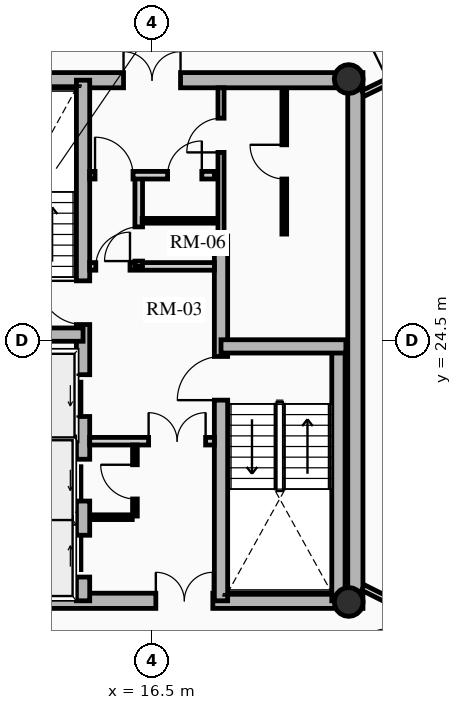
"""IFC4 building model, lengths in metres.
Left out: names, types, materials, properties, quantities, classifications, styles, units other than length and angle.
Written with IfcOpenShell. Run it as: python <this file> out.ifc"""

import sys

from ifc_helpers import new_model, si_unit, direction, frame, frame_2d, origin, origin_2d, place, context, subcontext, project, spatial, rectangle, hollow_circle, extrude, source, transform, mapped, element, fill, save


model = new_model("IFC4")
c1 = context("Model", 3, precision=1e-05, world=origin(), true_north=direction((0.0, 1.0)))
c2 = subcontext(c1, "Body", "Model", "MODEL_VIEW")
j1 = project(units=[si_unit("LENGTHUNIT", "METRE"), si_unit("PLANEANGLEUNIT", "RADIAN")], contexts=[c1])
p1 = place(None, origin())
s1 = spatial("IfcSite", under=j1, at=p1, CompositionType="ELEMENT")
p2 = place(p1, origin())
s2 = spatial("IfcBuilding", under=s1, at=p2, CompositionType="ELEMENT")
p3 = place(p2, frame((0.0, 0.0, 154.51)))
s3 = spatial("IfcBuildingStorey", under=s2, at=p3, CompositionType="ELEMENT", Elevation=154.51)
p4 = place(p3, frame((21.85, 17.45, 0.0), z_axis=(0.0, 0.0, 1.0), x_axis=(0.0, 1.0, 0.0)))
e1 = element("IfcWall", 1, at=p4, inside=s3, PredefinedType="SHEAR", context=c2, shape_type="SweptSolid", body=[
    extrude(rectangle(XDim=14.1, YDim=0.4, at=frame_2d((7.05, 0.0))), origin(), (0.0, 0.0, 1.0), 2.91),
])
p5 = place(p3, frame((11.15, 17.65, 0.0), z_axis=(0.0, 0.0, 1.0), x_axis=(1.0, 0.0, 0.0)))
e2 = element("IfcWall", 2, at=p5, inside=s3, PredefinedType="SHEAR", context=c2, shape_type="SweptSolid", body=[
    extrude(rectangle(XDim=10.7, YDim=0.4, at=frame_2d((5.35, 0.0))), origin(), (0.0, 0.0, 1.0), 2.91),
])
m1 = source(origin(), c2, "Body", "SweptSolid", [
    extrude(rectangle(XDim=1.5, YDim=2.02, at=frame_2d((0.75, 1.01))), frame((0.0, 0.21, 0.0), z_axis=(0.0, -1.0, 0.0), x_axis=(1.0, 0.0, 0.0)), (0.0, 0.0, 1.0), 0.42),
])
p6 = place(p5, frame((5.45, 0.0, 0.0)))
e3 = element("IfcOpeningElement", 3, at=p6, cuts=e2, PredefinedType="OPENING", context=c2, shape_type="MappedRepresentation", body=[
    mapped(m1, transform((0.0, 0.0, 0.0), x_axis=(1.0, 0.0, 0.0), y_axis=(0.0, 1.0, 0.0), z_axis=(0.0, 0.0, 1.0), scale=1.0)),
])
p7 = place(p3, frame((11.15, 31.35, 0.0), z_axis=(0.0, 0.0, 1.0), x_axis=(1.0, 0.0, 0.0)))
e4 = element("IfcWall", 4, at=p7, inside=s3, PredefinedType="SHEAR", context=c2, shape_type="SweptSolid", body=[
    extrude(rectangle(XDim=10.7, YDim=0.4, at=frame_2d((5.35, 0.0))), origin(), (0.0, 0.0, 1.0), 2.91),
])
p8 = place(p7, frame((4.6, 0.0, 0.0)))
e5 = element("IfcOpeningElement", 5, at=p8, cuts=e4, PredefinedType="OPENING", context=c2, shape_type="MappedRepresentation", body=[
    mapped(m1, transform((0.0, 0.0, 0.0), x_axis=(1.0, 0.0, 0.0), y_axis=(0.0, 1.0, 0.0), z_axis=(0.0, 0.0, 1.0), scale=1.0)),
])
p9 = place(p3, frame((14.685, 17.65, 0.0), z_axis=(0.0, 0.0, 1.0), x_axis=(0.0, 1.0, 0.0)))
e6 = element("IfcWall", 6, at=p9, inside=s3, PredefinedType="SHEAR", context=c2, shape_type="SweptSolid", body=[
    extrude(rectangle(XDim=13.7, YDim=0.35, at=frame_2d((6.85, 0.0))), origin(), (0.0, 0.0, 1.0), 2.91),
])
m2 = source(origin(), c2, "Body", "SweptSolid", [
    extrude(rectangle(XDim=1.1, YDim=2.015, at=frame_2d((0.55, 1.007))), frame((0.0, 0.185, 0.0), z_axis=(0.0, -1.0, 0.0), x_axis=(1.0, 0.0, 0.0)), (0.0, 0.0, 1.0), 0.37),
])
p10 = place(p9, frame((4.85, 0.0, 0.0)))
e7 = element("IfcOpeningElement", 7, at=p10, cuts=e6, PredefinedType="OPENING", context=c2, shape_type="MappedRepresentation", body=[
    mapped(m2, transform((0.0, 0.0, 0.0), x_axis=(1.0, 0.0, 0.0), y_axis=(0.0, 1.0, 0.0), z_axis=(0.0, 0.0, 1.0), scale=1.0)),
])
p11 = place(p9, frame((0.625, 0.0, 0.0)))
e8 = element("IfcOpeningElement", 8, at=p11, cuts=e6, PredefinedType="OPENING", context=c2, shape_type="MappedRepresentation", body=[
    mapped(m2, transform((0.0, 0.0, 0.0), x_axis=(1.0, 0.0, 0.0), y_axis=(0.0, 1.0, 0.0), z_axis=(0.0, 0.0, 1.0), scale=1.0)),
])
p12 = place(p9, frame((2.625, 0.0, 0.0)))
e9 = element("IfcOpeningElement", 9, at=p12, cuts=e6, PredefinedType="OPENING", context=c2, shape_type="MappedRepresentation", body=[
    mapped(m2, transform((0.0, 0.0, 0.0), x_axis=(1.0, 0.0, 0.0), y_axis=(0.0, 1.0, 0.0), z_axis=(0.0, 0.0, 1.0), scale=1.0)),
])
m3 = source(origin(), c2, "Body", "SweptSolid", [
    extrude(rectangle(XDim=1.15, YDim=2.02, at=frame_2d((0.575, 1.01))), frame((0.0, 0.185, 0.0), z_axis=(0.0, -1.0, 0.0), x_axis=(1.0, 0.0, 0.0)), (0.0, 0.0, 1.0), 0.37),
])
p13 = place(p9, frame((7.27, 0.0, 0.0)))
e10 = element("IfcOpeningElement", 10, at=p13, cuts=e6, PredefinedType="OPENING", context=c2, shape_type="MappedRepresentation", body=[
    mapped(m3, transform((0.0, 0.0, 0.0), x_axis=(1.0, 0.0, 0.0), y_axis=(0.0, 1.0, 0.0), z_axis=(0.0, 0.0, 1.0), scale=1.0)),
])
p14 = place(p3, frame((18.315, 17.65, 0.0), z_axis=(0.0, 0.0, 1.0), x_axis=(0.0, 1.0, 0.0)))
e11 = element("IfcWall", 11, at=p14, inside=s3, PredefinedType="SHEAR", context=c2, shape_type="SweptSolid", body=[
    extrude(rectangle(XDim=9.6, YDim=0.35, at=frame_2d((4.8, 0.0))), origin(), (0.0, 0.0, 1.0), 2.91),
])
p15 = place(p14, frame((5.28, 0.0, 0.0)))
e12 = element("IfcOpeningElement", 12, at=p15, cuts=e11, PredefinedType="OPENING", context=c2, shape_type="MappedRepresentation", body=[
    mapped(m3, transform((0.0, 0.0, 0.0), x_axis=(1.0, 0.0, 0.0), y_axis=(0.0, 1.0, 0.0), z_axis=(0.0, 0.0, 1.0), scale=1.0)),
])
p16 = place(p3, frame((11.4, 24.655, 0.0), z_axis=(0.0, 0.0, 1.0), x_axis=(1.0, 0.0, 0.0)))
e13 = element("IfcWall", 13, at=p16, inside=s3, PredefinedType="SHEAR", context=c2, shape_type="SweptSolid", body=[
    extrude(rectangle(XDim=3.285, YDim=0.35, at=frame_2d((1.643, 0.0))), origin(), (0.0, 0.0, 1.0), 2.91),
])
p17 = place(p3, frame((21.405, 17.65, 0.0), z_axis=(0.0, 0.0, 1.0), x_axis=(0.0, 1.0, 0.0)))
e14 = element("IfcWall", 14, at=p17, inside=s3, PredefinedType="SHEAR", context=c2, shape_type="SweptSolid", body=[
    extrude(rectangle(XDim=6.695, YDim=0.35, at=frame_2d((3.348, 0.0))), origin(), (0.0, 0.0, 1.0), 2.91),
])
p18 = place(p3, frame((18.315, 24.345, 0.0), z_axis=(0.0, 0.0, 1.0), x_axis=(1.0, 0.0, 0.0)))
e15 = element("IfcWall", 15, at=p18, inside=s3, PredefinedType="SHEAR", context=c2, shape_type="SweptSolid", body=[
    extrude(rectangle(XDim=3.285, YDim=0.35, at=frame_2d((1.643, 0.0))), origin(), (0.0, 0.0, 1.0), 2.91),
])
for number, where, z_axis, x_axis in (
    (16, (21.675, 17.62, 0.0), (0.0, 0.0, 1.0), (1.0, 0.0, 0.0)),
    (17, (21.675, 31.38, 0.0), (0.0, 0.0, 1.0), (1.0, 0.0, 0.0)),
):
    element("IfcColumn", number, at=place(p3, frame(where, z_axis=z_axis, x_axis=x_axis)), inside=s3, PredefinedType="COLUMN", context=c2, shape_type="SweptSolid", body=[
        extrude(hollow_circle(Radius=0.38, WallThickness=0.032, at=origin_2d()), origin(), (0.0, 0.0, 1.0), 2.91),
    ])
for number, where, z_axis, x_axis in (
    (18, (11.52, 21.8, 0.0), (0.0, 0.0, 1.0), (1.0, 0.0, 0.0)),
    (19, (11.52, 19.825, 0.0), (0.0, 0.0, 1.0), (1.0, 0.0, 0.0)),
):
    element("IfcWall", number, at=place(p3, frame(where, z_axis=z_axis, x_axis=x_axis)), inside=s3, PredefinedType="SHEAR", context=c2, shape_type="SweptSolid", body=[
        extrude(rectangle(XDim=2.97, YDim=0.2, at=frame_2d((1.485, 0.0))), origin(), (0.0, 0.0, 1.0), 2.91),
    ])
p19 = place(p3, frame((14.86, 21.85, 0.0), z_axis=(0.0, 0.0, 1.0), x_axis=(1.0, 0.0, 0.0)))
e20 = element("IfcWall", 20, at=p19, inside=s3, PredefinedType="PARTITIONING", context=c2, shape_type="SweptSolid", body=[
    extrude(rectangle(XDim=3.28, YDim=0.2, at=frame_2d((1.64, 0.0))), origin(), (0.0, 0.0, 1.0), 2.675),
])
m4 = source(origin(), c2, "Body", "SweptSolid", [
    extrude(rectangle(XDim=1.5, YDim=2.02, at=frame_2d((0.75, 1.01))), frame((0.0, 0.11, 0.0), z_axis=(0.0, -1.0, 0.0), x_axis=(1.0, 0.0, 0.0)), (0.0, 0.0, 1.0), 0.22),
])
p20 = place(p19, frame((1.55, 0.0, 0.0)))
e21 = element("IfcOpeningElement", 21, at=p20, cuts=e20, PredefinedType="OPENING", context=c2, shape_type="MappedRepresentation", body=[
    mapped(m4, transform((0.0, 0.0, 0.0), x_axis=(1.0, 0.0, 0.0), y_axis=(0.0, 1.0, 0.0), z_axis=(0.0, 0.0, 1.0), scale=1.0)),
])
p21 = place(p3, frame((14.86, 26.45, 0.0), z_axis=(0.0, 0.0, 1.0), x_axis=(1.0, 0.0, 0.0)))
e22 = element("IfcWall", 22, at=p21, inside=s3, PredefinedType="PARTITIONING", context=c2, shape_type="SweptSolid", body=[
    extrude(rectangle(XDim=3.28, YDim=0.2, at=frame_2d((1.64, 0.0))), origin(), (0.0, 0.0, 1.0), 2.675),
])
m5 = source(origin(), c2, "Body", "SweptSolid", [
    extrude(rectangle(XDim=0.9, YDim=2.005, at=frame_2d((0.45, 1.002))), frame((0.0, 0.11, 0.0), z_axis=(0.0, -1.0, 0.0), x_axis=(1.0, 0.0, 0.0)), (0.0, 0.0, 1.0), 0.22),
])
p22 = place(p21, frame((0.16, 0.0, 0.0)))
e23 = element("IfcOpeningElement", 23, at=p22, cuts=e22, PredefinedType="OPENING", context=c2, shape_type="MappedRepresentation", body=[
    mapped(m5, transform((0.0, 0.0, 0.0), x_axis=(1.0, 0.0, 0.0), y_axis=(0.0, 1.0, 0.0), z_axis=(0.0, 0.0, 1.0), scale=1.0)),
])
p23 = place(p3, frame((16.15, 26.45, 0.0), z_axis=(0.0, 0.0, 1.0), x_axis=(0.0, 1.0, 0.0)))
e24 = element("IfcWall", 24, at=p23, inside=s3, PredefinedType="PARTITIONING", context=c2, shape_type="SweptSolid", body=[
    extrude(rectangle(XDim=2.4, YDim=0.2, at=frame_2d((1.2, 0.0))), origin(), (0.0, 0.0, 1.0), 2.675),
])
p24 = place(p23, frame((0.14, 0.0, 0.0)))
e25 = element("IfcOpeningElement", 25, at=p24, cuts=e24, PredefinedType="OPENING", context=c2, shape_type="MappedRepresentation", body=[
    mapped(m5, transform((0.0, 0.0, 0.0), x_axis=(1.0, 0.0, 0.0), y_axis=(0.0, 1.0, 0.0), z_axis=(0.0, 0.0, 1.0), scale=1.0)),
])
p25 = place(p3, frame((14.86, 28.85, 0.0), z_axis=(0.0, 0.0, 1.0), x_axis=(1.0, 0.0, 0.0)))
e26 = element("IfcWall", 26, at=p25, inside=s3, PredefinedType="PARTITIONING", context=c2, shape_type="SweptSolid", body=[
    extrude(rectangle(XDim=3.28, YDim=0.2, at=frame_2d((1.64, 0.0))), origin(), (0.0, 0.0, 1.0), 2.675),
])
m6 = source(origin(), c2, "Body", "SweptSolid", [
    extrude(rectangle(XDim=1.0, YDim=2.015, at=frame_2d((0.5, 1.007))), frame((0.0, 0.11, 0.0), z_axis=(0.0, -1.0, 0.0), x_axis=(1.0, 0.0, 0.0)), (0.0, 0.0, 1.0), 0.22),
])
p26 = place(p25, frame((0.14, 0.0, 0.0)))
e27 = element("IfcOpeningElement", 27, at=p26, cuts=e26, PredefinedType="OPENING", context=c2, shape_type="MappedRepresentation", body=[
    mapped(m6, transform((0.0, 0.0, 0.0), x_axis=(1.0, 0.0, 0.0), y_axis=(0.0, 1.0, 0.0), z_axis=(0.0, 0.0, 1.0), scale=1.0)),
])
p27 = place(p25, frame((2.05, 0.0, 0.0)))
e28 = element("IfcOpeningElement", 28, at=p27, cuts=e26, PredefinedType="OPENING", context=c2, shape_type="MappedRepresentation", body=[
    mapped(m5, transform((0.0, 0.0, 0.0), x_axis=(1.0, 0.0, 0.0), y_axis=(0.0, 1.0, 0.0), z_axis=(0.0, 0.0, 1.0), scale=1.0)),
])
p28 = place(p3, frame((16.05, 19.88, 0.0), z_axis=(0.0, 0.0, 1.0), x_axis=(0.0, 1.0, 0.0)))
e29 = element("IfcWall", 29, at=p28, inside=s3, PredefinedType="PARTITIONING", context=c2, shape_type="SweptSolid", body=[
    extrude(rectangle(XDim=1.87, YDim=0.125, at=frame_2d((0.935, 0.0))), origin(), (0.0, 0.0, 1.0), 2.675),
])
m7 = source(origin(), c2, "Body", "SweptSolid", [
    extrude(rectangle(XDim=0.9, YDim=2.005, at=frame_2d((0.45, 1.002))), frame((0.0, 0.073, 0.0), z_axis=(0.0, -1.0, 0.0), x_axis=(1.0, 0.0, 0.0)), (0.0, 0.0, 1.0), 0.145),
])
p29 = place(p28, frame((0.45, 0.0, 0.0)))
e30 = element("IfcOpeningElement", 30, at=p29, cuts=e29, PredefinedType="OPENING", context=c2, shape_type="MappedRepresentation", body=[
    mapped(m7, transform((0.0, 0.0, 0.0), x_axis=(1.0, 0.0, 0.0), y_axis=(0.0, 1.0, 0.0), z_axis=(0.0, 0.0, 1.0), scale=1.0)),
])
p30 = place(p3, frame((14.88, 19.85, 0.0), z_axis=(0.0, 0.0, 1.0), x_axis=(1.0, 0.0, 0.0)))
e31 = element("IfcWall", 31, at=p30, inside=s3, PredefinedType="PARTITIONING", context=c2, shape_type="SweptSolid", body=[
    extrude(rectangle(XDim=1.1, YDim=0.125, at=frame_2d((0.55, 0.0))), origin(), (0.0, 0.0, 1.0), 2.675),
])
p31 = place(p3, frame((16.24, 27.65, 0.0), z_axis=(0.0, 0.0, 1.0), x_axis=(1.0, 0.0, 0.0)))
e32 = element("IfcWall", 32, at=p31, inside=s3, PredefinedType="PARTITIONING", context=c2, shape_type="SweptSolid", body=[
    extrude(rectangle(XDim=1.88, YDim=0.125, at=frame_2d((0.94, 0.0))), origin(), (0.0, 0.0, 1.0), 2.675),
])
p32 = place(p3, frame((18.315, 27.25, 0.0), z_axis=(0.0, 0.0, 1.0), x_axis=(0.0, 1.0, 0.0)))
e33 = element("IfcWall", 33, at=p32, inside=s3, PredefinedType="PARTITIONING", context=c2, shape_type="SweptSolid", body=[
    extrude(rectangle(XDim=3.9, YDim=0.16, at=frame_2d((1.95, 0.0))), origin(), (0.0, 0.0, 1.0), 2.675),
])
m8 = source(origin(), c2, "Body", "SweptSolid", [
    extrude(rectangle(XDim=0.9, YDim=2.005, at=frame_2d((0.45, 1.002))), frame((0.0, 0.09, 0.0), z_axis=(0.0, -1.0, 0.0), x_axis=(1.0, 0.0, 0.0)), (0.0, 0.0, 1.0), 0.18),
])
p33 = place(p32, frame((2.2, 0.0, 0.0)))
e34 = element("IfcOpeningElement", 34, at=p33, cuts=e33, PredefinedType="OPENING", context=c2, shape_type="MappedRepresentation", body=[
    mapped(m8, transform((0.0, 0.0, 0.0), x_axis=(1.0, 0.0, 0.0), y_axis=(0.0, 1.0, 0.0), z_axis=(0.0, 0.0, 1.0), scale=1.0)),
])
p34 = place(p3, frame((19.98, 27.3, 0.0), z_axis=(0.0, 0.0, 1.0), x_axis=(0.0, 1.0, 0.0)))
e35 = element("IfcWall", 35, at=p34, inside=s3, PredefinedType="PARTITIONING", context=c2, shape_type="SweptSolid", body=[
    extrude(rectangle(XDim=3.82, YDim=0.125, at=frame_2d((1.91, 0.0))), origin(), (0.0, 0.0, 1.0), 2.675),
])
p35 = place(p34, frame((1.45, 0.0, 0.0)))
e36 = element("IfcOpeningElement", 36, at=p35, cuts=e35, PredefinedType="OPENING", context=c2, shape_type="MappedRepresentation", body=[
    mapped(m7, transform((0.0, 0.0, 0.0), x_axis=(1.0, 0.0, 0.0), y_axis=(0.0, 1.0, 0.0), z_axis=(0.0, 0.0, 1.0), scale=1.0)),
])
p36 = place(p3, frame((22.05, 31.0, 0.0), z_axis=(0.0, 0.0, 1.0), x_axis=(0.900241516545, 0.435390872537, 0.0)))
e37 = element("IfcWall", 37, at=p36, inside=s3, PredefinedType="PARTITIONING", context=c2, shape_type="SweptSolid", body=[
    extrude(rectangle(XDim=1.989, YDim=0.16, at=frame_2d((0.995, 0.0))), origin(), (0.0, 0.0, 1.0), 2.245),
])
m9 = source(origin(), c2, "Body", "SweptSolid", [
    extrude(rectangle(XDim=1.05, YDim=2.015, at=frame_2d((0.525, 1.007))), frame((0.0, 0.09, 0.0), z_axis=(0.0, -1.0, 0.0), x_axis=(1.0, 0.0, 0.0)), (0.0, 0.0, 1.0), 0.18),
])
p37 = place(p36, frame((0.739, 0.0, 0.0)))
e38 = element("IfcOpeningElement", 38, at=p37, cuts=e37, PredefinedType="OPENING", context=c2, shape_type="MappedRepresentation", body=[
    mapped(m9, transform((0.0, 0.0, 0.0), x_axis=(1.0, 0.0, 0.0), y_axis=(0.0, 1.0, 0.0), z_axis=(0.0, 0.0, 1.0), scale=1.0)),
])
p38 = place(p3, frame((22.05, 18.0, 0.0), z_axis=(0.0, 0.0, 1.0), x_axis=(0.893817206679, -0.448431489799, 0.0)))
e39 = element("IfcWall", 39, at=p38, inside=s3, PredefinedType="PARTITIONING", context=c2, shape_type="SweptSolid", body=[
    extrude(rectangle(XDim=2.084, YDim=0.16, at=frame_2d((1.042, 0.0))), origin(), (0.0, 0.0, 1.0), 2.245),
])
p39 = place(p38, frame((0.834, 0.0, 0.0)))
e40 = element("IfcOpeningElement", 40, at=p39, cuts=e39, PredefinedType="OPENING", context=c2, shape_type="MappedRepresentation", body=[
    mapped(m9, transform((0.0, 0.0, 0.0), x_axis=(1.0, 0.0, 0.0), y_axis=(0.0, 1.0, 0.0), z_axis=(0.0, 0.0, 1.0), scale=1.0)),
])
m10 = source(origin(), c2, "Body", "SweptSolid", [
    extrude(rectangle(XDim=1.1, YDim=2.015, at=frame_2d((0.55, 1.007))), frame((0.0, 0.025, 0.0), z_axis=(0.0, -1.0, 0.0), x_axis=(1.0, 0.0, 0.0)), (0.0, 0.0, 1.0), 0.05),
])
p40 = place(p10, origin())
e41 = element("IfcDoor", 41, at=p40, inside=s3, OperationType="SLIDING_TO_LEFT", PredefinedType="DOOR", context=c2, shape_type="MappedRepresentation", body=[
    mapped(m10, transform((0.0, 0.0, 0.0), x_axis=(1.0, 0.0, 0.0), y_axis=(0.0, 1.0, 0.0), z_axis=(0.0, 0.0, 1.0), scale=1.0)),
])
fill(e7, e41)
p41 = place(p11, origin())
e42 = element("IfcDoor", 42, at=p41, inside=s3, OperationType="SLIDING_TO_RIGHT", PredefinedType="DOOR", context=c2, shape_type="MappedRepresentation", body=[
    mapped(m10, transform((0.0, 0.0, 0.0), x_axis=(1.0, 0.0, 0.0), y_axis=(0.0, 1.0, 0.0), z_axis=(0.0, 0.0, 1.0), scale=1.0)),
])
fill(e8, e42)
p42 = place(p12, origin())
e43 = element("IfcDoor", 43, at=p42, inside=s3, OperationType="SLIDING_TO_LEFT", PredefinedType="DOOR", context=c2, shape_type="MappedRepresentation", body=[
    mapped(m10, transform((0.0, 0.0, 0.0), x_axis=(1.0, 0.0, 0.0), y_axis=(0.0, 1.0, 0.0), z_axis=(0.0, 0.0, 1.0), scale=1.0)),
])
fill(e9, e43)
m11 = source(origin(), c2, "Body", "SweptSolid", [
    extrude(rectangle(XDim=1.15, YDim=2.02, at=frame_2d((0.575, 1.01))), frame((0.0, 0.025, 0.0), z_axis=(0.0, -1.0, 0.0), x_axis=(1.0, 0.0, 0.0)), (0.0, 0.0, 1.0), 0.05),
])
p43 = place(p13, origin())
e44 = element("IfcDoor", 44, at=p43, inside=s3, OperationType="SINGLE_SWING_RIGHT", PredefinedType="DOOR", context=c2, shape_type="MappedRepresentation", body=[
    mapped(m11, transform((0.0, 0.0, 0.0), x_axis=(1.0, 0.0, 0.0), y_axis=(0.0, 1.0, 0.0), z_axis=(0.0, 0.0, 1.0), scale=1.0)),
])
fill(e10, e44)
p44 = place(p15, origin())
e45 = element("IfcDoor", 45, at=p44, inside=s3, OperationType="SINGLE_SWING_LEFT", PredefinedType="DOOR", context=c2, shape_type="MappedRepresentation", body=[
    mapped(m11, transform((0.0, 0.0, 0.0), x_axis=(1.0, 0.0, 0.0), y_axis=(0.0, 1.0, 0.0), z_axis=(0.0, 0.0, 1.0), scale=1.0)),
])
fill(e12, e45)
m12 = source(origin(), c2, "Body", "SweptSolid", [
    extrude(rectangle(XDim=1.5, YDim=2.02, at=frame_2d((0.75, 1.01))), frame((0.0, 0.025, 0.0), z_axis=(0.0, -1.0, 0.0), x_axis=(1.0, 0.0, 0.0)), (0.0, 0.0, 1.0), 0.05),
])
p45 = place(p8, origin())
e46 = element("IfcDoor", 46, at=p45, inside=s3, OperationType="DOUBLE_DOOR_SINGLE_SWING", PredefinedType="DOOR", context=c2, shape_type="MappedRepresentation", body=[
    mapped(m12, transform((0.0, 0.0, 0.0), x_axis=(1.0, 0.0, 0.0), y_axis=(0.0, 1.0, 0.0), z_axis=(0.0, 0.0, 1.0), scale=1.0)),
])
fill(e5, e46)
p46 = place(p6, origin())
e47 = element("IfcDoor", 47, at=p46, inside=s3, OperationType="DOUBLE_DOOR_SINGLE_SWING", PredefinedType="DOOR", context=c2, shape_type="MappedRepresentation", body=[
    mapped(m12, transform((0.0, 0.0, 0.0), x_axis=(1.0, 0.0, 0.0), y_axis=(0.0, 1.0, 0.0), z_axis=(0.0, 0.0, 1.0), scale=1.0)),
])
fill(e3, e47)
p47 = place(p20, origin())
e48 = element("IfcDoor", 48, at=p47, inside=s3, OperationType="DOUBLE_DOOR_SINGLE_SWING", PredefinedType="DOOR", context=c2, shape_type="MappedRepresentation", body=[
    mapped(m12, transform((0.0, 0.0, 0.0), x_axis=(1.0, 0.0, 0.0), y_axis=(0.0, 1.0, 0.0), z_axis=(0.0, 0.0, 1.0), scale=1.0)),
])
fill(e21, e48)
m13 = source(origin(), c2, "Body", "SweptSolid", [
    extrude(rectangle(XDim=0.9, YDim=2.005, at=frame_2d((0.45, 1.002))), frame((0.0, 0.025, 0.0), z_axis=(0.0, -1.0, 0.0), x_axis=(1.0, 0.0, 0.0)), (0.0, 0.0, 1.0), 0.05),
])
p48 = place(p22, origin())
e49 = element("IfcDoor", 49, at=p48, inside=s3, OperationType="SINGLE_SWING_RIGHT", PredefinedType="DOOR", context=c2, shape_type="MappedRepresentation", body=[
    mapped(m13, transform((0.0, 0.0, 0.0), x_axis=(1.0, 0.0, 0.0), y_axis=(0.0, 1.0, 0.0), z_axis=(0.0, 0.0, 1.0), scale=1.0)),
])
fill(e23, e49)
m14 = source(origin(), c2, "Body", "SweptSolid", [
    extrude(rectangle(XDim=1.0, YDim=2.015, at=frame_2d((0.5, 1.007))), frame((0.0, 0.025, 0.0), z_axis=(0.0, -1.0, 0.0), x_axis=(1.0, 0.0, 0.0)), (0.0, 0.0, 1.0), 0.05),
])
p49 = place(p26, origin())
e50 = element("IfcDoor", 50, at=p49, inside=s3, OperationType="SINGLE_SWING_LEFT", PredefinedType="DOOR", context=c2, shape_type="MappedRepresentation", body=[
    mapped(m14, transform((0.0, 0.0, 0.0), x_axis=(1.0, 0.0, 0.0), y_axis=(0.0, 1.0, 0.0), z_axis=(0.0, 0.0, 1.0), scale=1.0)),
])
fill(e27, e50)
p50 = place(p29, origin())
e51 = element("IfcDoor", 51, at=p50, inside=s3, OperationType="SINGLE_SWING_RIGHT", PredefinedType="DOOR", context=c2, shape_type="MappedRepresentation", body=[
    mapped(m13, transform((0.0, 0.0, 0.0), x_axis=(1.0, 0.0, 0.0), y_axis=(0.0, 1.0, 0.0), z_axis=(0.0, 0.0, 1.0), scale=1.0)),
])
fill(e30, e51)
p51 = place(p24, origin())
e52 = element("IfcDoor", 52, at=p51, inside=s3, OperationType="SINGLE_SWING_LEFT", PredefinedType="DOOR", context=c2, shape_type="MappedRepresentation", body=[
    mapped(m13, transform((0.0, 0.0, 0.0), x_axis=(1.0, 0.0, 0.0), y_axis=(0.0, 1.0, 0.0), z_axis=(0.0, 0.0, 1.0), scale=1.0)),
])
fill(e25, e52)
p52 = place(p27, origin())
e53 = element("IfcDoor", 53, at=p52, inside=s3, OperationType="SINGLE_SWING_RIGHT", PredefinedType="DOOR", context=c2, shape_type="MappedRepresentation", body=[
    mapped(m13, transform((0.0, 0.0, 0.0), x_axis=(1.0, 0.0, 0.0), y_axis=(0.0, 1.0, 0.0), z_axis=(0.0, 0.0, 1.0), scale=1.0)),
])
fill(e28, e53)
p53 = place(p33, origin())
e54 = element("IfcDoor", 54, at=p53, inside=s3, OperationType="SINGLE_SWING_LEFT", PredefinedType="DOOR", context=c2, shape_type="MappedRepresentation", body=[
    mapped(m13, transform((0.0, 0.0, 0.0), x_axis=(1.0, 0.0, 0.0), y_axis=(0.0, 1.0, 0.0), z_axis=(0.0, 0.0, 1.0), scale=1.0)),
])
fill(e34, e54)
p54 = place(p35, origin())
e55 = element("IfcDoor", 55, at=p54, inside=s3, OperationType="SINGLE_SWING_RIGHT", PredefinedType="DOOR", context=c2, shape_type="MappedRepresentation", body=[
    mapped(m13, transform((0.0, 0.0, 0.0), x_axis=(1.0, 0.0, 0.0), y_axis=(0.0, 1.0, 0.0), z_axis=(0.0, 0.0, 1.0), scale=1.0)),
])
fill(e36, e55)
save(model, sys.argv[1])
